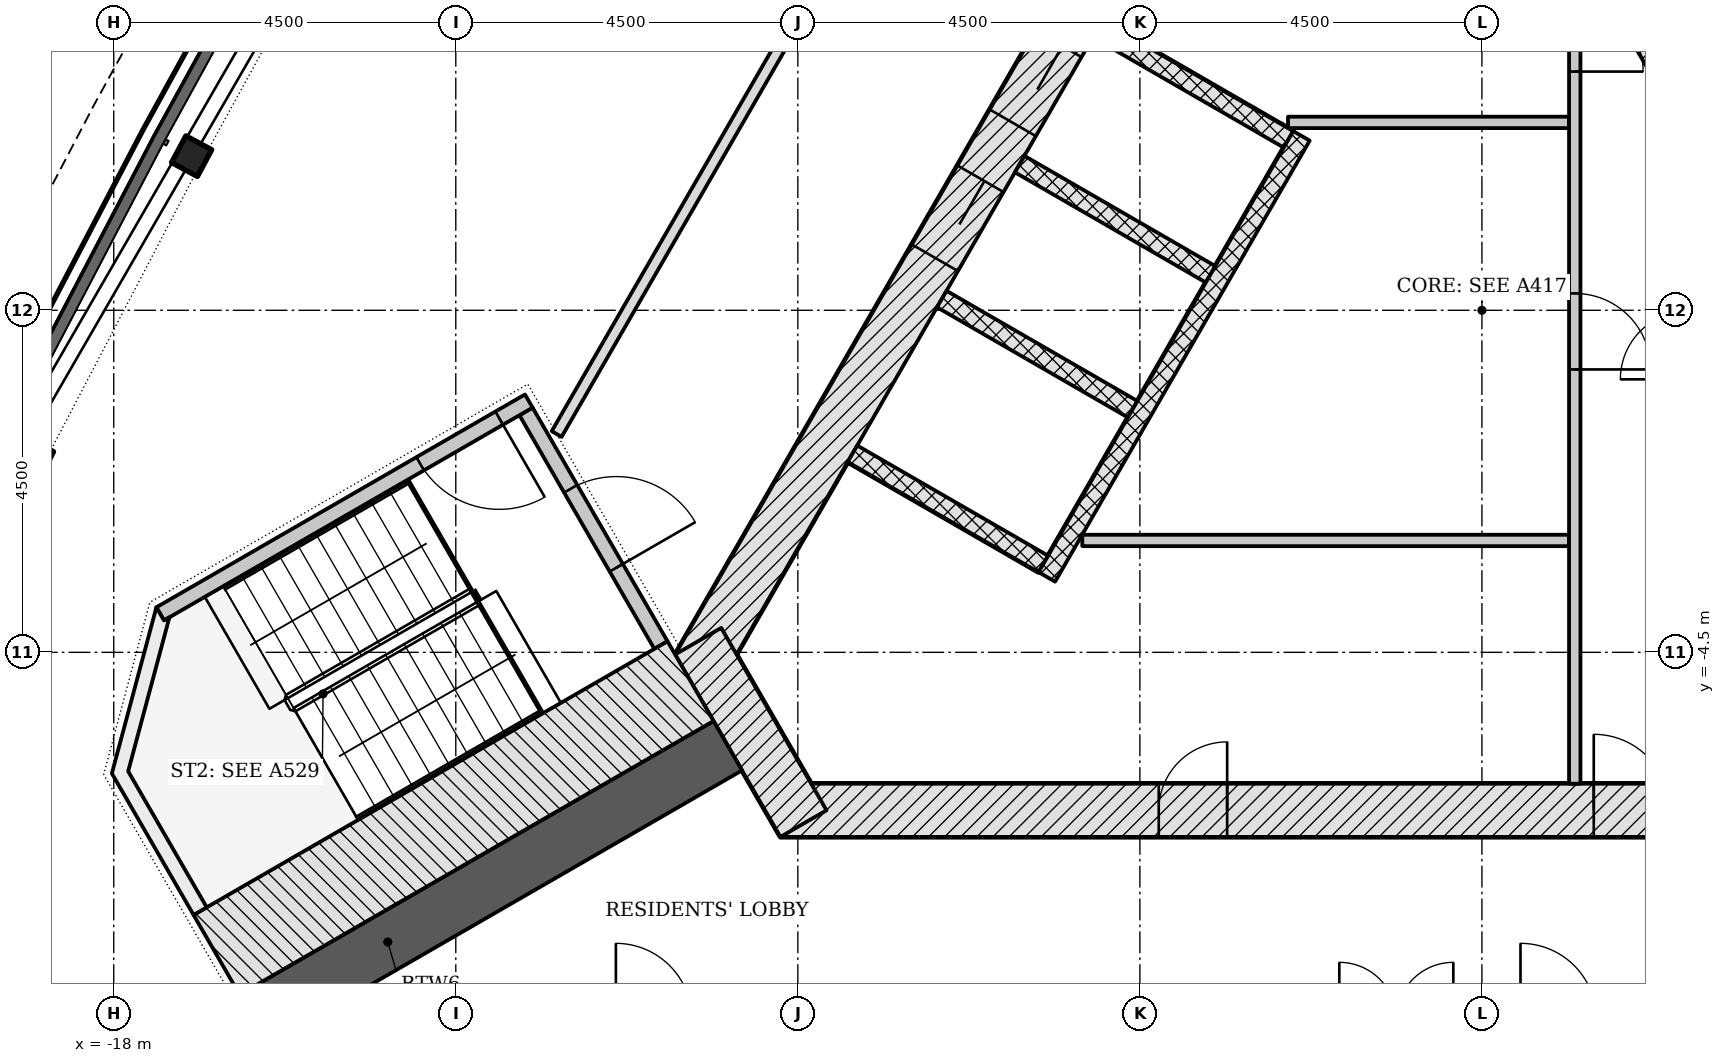
"""IFC4 building model, lengths in metres.
Left out: names, types, materials, properties, quantities, classifications, styles, units other than length and angle.
Written with IfcOpenShell. Run it as: python <this file> out.ifc"""

import sys

from ifc_helpers import new_model, si_unit, direction, frame, frame_2d, origin, origin_2d, place, context, subcontext, project, spatial, polyline, rectangle, i_section, outline, extrude, element, fill, save


model = new_model("IFC4")
c1 = context("Model", 3, precision=1e-05, world=origin(), true_north=direction((0.0, 1.0)))
c2 = subcontext(c1, "Body", "Model", "MODEL_VIEW")
j1 = project(units=[si_unit("LENGTHUNIT", "METRE"), si_unit("PLANEANGLEUNIT", "RADIAN")], contexts=[c1])
p1 = place(None, origin())
s1 = spatial("IfcSite", under=j1, at=p1, CompositionType="ELEMENT")
p2 = place(p1, origin())
s2 = spatial("IfcBuilding", under=s1, at=p2, CompositionType="ELEMENT")
p3 = place(p2, frame((0.0, 0.0, 158.1)))
s3 = spatial("IfcBuildingStorey", under=s2, at=p3, CompositionType="ELEMENT", Elevation=158.1)
p4 = place(p3, frame((-9.229, -6.578, -0.2), z_axis=(0.0, 0.0, 1.0), x_axis=(1.0, 0.0, 0.0)))
e1 = element("IfcWall", 1, at=p4, inside=s3, PredefinedType="SHEAR", context=c2, shape_type="SweptSolid", body=[
    extrude(rectangle(XDim=18.458, YDim=0.7, at=frame_2d((9.229, 0.0))), origin(), (0.0, 0.0, 1.0), 3.6),
])
p5 = place(p4, frame((10.7, 0.0, 0.2)))
e2 = element("IfcOpeningElement", 2, at=p5, cuts=e1, PredefinedType="OPENING", context=c2, shape_type="SweptSolid", body=[
    extrude(rectangle(XDim=1.0, YDim=2.1, at=frame_2d((0.5, 1.05))), frame((0.0, 0.36, 0.0), z_axis=(0.0, -1.0, 0.0), x_axis=(1.0, 0.0, 0.0)), (0.0, 0.0, 1.0), 0.72),
])
p6 = place(p4, frame((4.977, 0.0, 0.2)))
e3 = element("IfcOpeningElement", 3, at=p6, cuts=e1, PredefinedType="OPENING", context=c2, shape_type="SweptSolid", body=[
    extrude(rectangle(XDim=0.9, YDim=2.1, at=frame_2d((0.45, 1.05))), frame((0.0, 0.36, 0.0), z_axis=(0.0, -1.0, 0.0), x_axis=(1.0, 0.0, 0.0)), (0.0, 0.0, 1.0), 0.72),
])
p7 = place(p4, frame((14.552, 0.0, 0.2)))
e4 = element("IfcOpeningElement", 4, at=p7, cuts=e1, PredefinedType="OPENING", context=c2, shape_type="SweptSolid", body=[
    extrude(rectangle(XDim=0.9, YDim=2.1, at=frame_2d((0.45, 1.05))), frame((0.0, 0.36, 0.0), z_axis=(0.0, -1.0, 0.0), x_axis=(1.0, 0.0, 0.0)), (0.0, 0.0, 1.0), 0.72),
])
p8 = place(p3, frame((10.311, -4.703, -0.2), z_axis=(0.0, 0.0, 1.0), x_axis=(-0.500001446645, 0.866024568562, 0.0)))
e5 = element("IfcWall", 5, at=p8, inside=s3, PredefinedType="SHEAR", context=c2, shape_type="SweptSolid", body=[
    extrude(rectangle(XDim=18.458, YDim=0.7, at=frame_2d((9.229, 0.0))), origin(), (0.0, 0.0, 1.0), 3.6),
])
p9 = place(p8, frame((4.379, 0.0, 0.2)))
e6 = element("IfcOpeningElement", 6, at=p9, cuts=e5, PredefinedType="OPENING", context=c2, shape_type="SweptSolid", body=[
    extrude(rectangle(XDim=1.1, YDim=2.1, at=frame_2d((0.55, 1.05))), frame((0.0, 0.36, 0.0), z_axis=(0.0, -1.0, 0.0), x_axis=(1.0, 0.0, 0.0)), (0.0, 0.0, 1.0), 0.72),
])
p10 = place(p8, frame((6.529, 0.0, 0.2)))
e7 = element("IfcOpeningElement", 7, at=p10, cuts=e5, PredefinedType="OPENING", context=c2, shape_type="SweptSolid", body=[
    extrude(rectangle(XDim=1.1, YDim=2.1, at=frame_2d((0.55, 1.05))), frame((0.0, 0.36, 0.0), z_axis=(0.0, -1.0, 0.0), x_axis=(1.0, 0.0, 0.0)), (0.0, 0.0, 1.0), 0.72),
])
p11 = place(p8, frame((8.679, 0.0, 0.2)))
e8 = element("IfcOpeningElement", 8, at=p11, cuts=e5, PredefinedType="OPENING", context=c2, shape_type="SweptSolid", body=[
    extrude(rectangle(XDim=1.1, YDim=2.1, at=frame_2d((0.55, 1.05))), frame((0.0, 0.36, 0.0), z_axis=(0.0, -1.0, 0.0), x_axis=(1.0, 0.0, 0.0)), (0.0, 0.0, 1.0), 0.72),
])
p12 = place(p8, frame((10.829, 0.0, 0.2)))
e9 = element("IfcOpeningElement", 9, at=p12, cuts=e5, PredefinedType="OPENING", context=c2, shape_type="SweptSolid", body=[
    extrude(rectangle(XDim=1.1, YDim=2.1, at=frame_2d((0.55, 1.05))), frame((0.0, 0.36, 0.0), z_axis=(0.0, -1.0, 0.0), x_axis=(1.0, 0.0, 0.0)), (0.0, 0.0, 1.0), 0.72),
])
p13 = place(p8, frame((12.979, 0.0, 0.2)))
e10 = element("IfcOpeningElement", 10, at=p13, cuts=e5, PredefinedType="OPENING", context=c2, shape_type="SweptSolid", body=[
    extrude(rectangle(XDim=1.1, YDim=2.1, at=frame_2d((0.55, 1.05))), frame((0.0, 0.36, 0.0), z_axis=(0.0, -1.0, 0.0), x_axis=(1.0, 0.0, 0.0)), (0.0, 0.0, 1.0), 0.72),
])
p14 = place(p3, frame((-1.083, 11.281, -0.2), z_axis=(0.0, 0.0, 1.0), x_axis=(-0.500001446645, -0.866024568562, 0.0)))
e11 = element("IfcWall", 11, at=p14, inside=s3, PredefinedType="SHEAR", context=c2, shape_type="SweptSolid", body=[
    extrude(rectangle(XDim=18.458, YDim=0.7, at=frame_2d((9.229, 0.0))), origin(), (0.0, 0.0, 1.0), 3.6),
])
p15 = place(p14, frame((8.979, 0.0, 0.2)))
e12 = element("IfcOpeningElement", 12, at=p15, cuts=e11, PredefinedType="OPENING", context=c2, shape_type="SweptSolid", body=[
    extrude(rectangle(XDim=1.2, YDim=2.1, at=frame_2d((0.6, 1.05))), frame((0.0, 0.36, 0.0), z_axis=(0.0, -1.0, 0.0), x_axis=(1.0, 0.0, 0.0)), (0.0, 0.0, 1.0), 0.72),
])
p16 = place(p14, frame((11.029, 0.0, 0.2)))
e13 = element("IfcOpeningElement", 13, at=p16, cuts=e11, PredefinedType="OPENING", context=c2, shape_type="SweptSolid", body=[
    extrude(rectangle(XDim=1.2, YDim=2.1, at=frame_2d((0.6, 1.05))), frame((0.0, 0.36, 0.0), z_axis=(0.0, -1.0, 0.0), x_axis=(1.0, 0.0, 0.0)), (0.0, 0.0, 1.0), 0.72),
])
p17 = place(p3, frame((-10.311, -4.353, -0.2), z_axis=(0.0, 0.0, 1.0), x_axis=(0.500042739161, -0.866000726912, 0.0)))
e14 = element("IfcWall", 14, at=p17, inside=s3, PredefinedType="SHEAR", context=c2, shape_type="SweptSolid", body=[
    extrude(rectangle(XDim=2.771, YDim=0.7, at=frame_2d((1.386, 0.0))), origin(), (0.0, 0.0, 1.0), 3.6),
])
p18 = place(p3, frame((-9.922, -5.728, -0.2), z_axis=(0.0, 0.0, 1.0), x_axis=(-0.866025410072, -0.499999989109, 0.0)))
e15 = element("IfcWall", 15, at=p18, inside=s3, PredefinedType="SHEAR", context=c2, shape_type="SweptSolid", body=[
    extrude(rectangle(XDim=10.331, YDim=0.75, at=frame_2d((5.165, 0.0))), origin(), (0.0, 0.0, 1.0), 3.6),
])
for number, where, z_axis, x_axis in (
    (16, (-16.975, 2.028, -0.2), (0.0, 0.0, 1.0), (-0.473, -0.881, 0.0)),
    (17, (-19.055, -1.95, -0.2), (0.0, 0.0, 1.0), (-0.454, -0.891, 0.0)),
):
    element("IfcColumn", number, at=place(p3, frame(where, z_axis=z_axis, x_axis=x_axis)), inside=s3, PredefinedType="COLUMN", context=c2, shape_type="SweptSolid", body=[
        extrude(i_section(OverallWidth=0.399, OverallDepth=0.386, WebThickness=0.021, FlangeThickness=0.033, FilletRadius=0.015, at=origin_2d()), origin(), (0.0, 0.0, 1.0), 3.6),
    ])
p19 = place(p3, origin())
e18 = element("IfcWall", 18, at=p19, inside=s3, PredefinedType="NOTDEFINED", context=c2, shape_type="SweptSolid", body=[
    extrude(outline(polyline([(-21.545, -5.731), (-22.663, -8.078), (-23.092, -9.461), (-23.129, -10.908), (-22.773, -12.312), (-22.049, -13.566), (-21.011, -14.576), (-19.739, -15.267), (-18.327, -15.587), (-15.736, -15.793), (-15.712, -15.494), (-18.281, -15.29), (-19.632, -14.984), (-20.832, -14.333), (-21.81, -13.38), (-22.492, -12.198), (-22.828, -10.875), (-22.793, -9.51), (-22.382, -8.187), (-21.275, -5.86), (-21.545, -5.731)])), origin(), (0.0, 0.0, 1.0), 3.3),
])
p20 = place(p3, frame((5.87, -2.961, 0.0), z_axis=(0.0, 0.0, 1.0), x_axis=(-0.50000615651, 0.866021849293, 0.0)))
e19 = element("IfcWall", 19, at=p20, inside=s3, PredefinedType="PARTITIONING", context=c2, shape_type="SweptSolid", body=[
    extrude(rectangle(XDim=11.0, YDim=0.25, at=frame_2d((5.5, 0.0))), origin(), (0.0, 0.0, 1.0), 3.4),
])
for number, where, z_axis, x_axis in (
    (20, (-5.056, 3.699, -0.2), (0.0, 0.0, 1.0), (0.866, -0.5, 0.0)),
    (21, (-6.081, 1.923, -0.2), (0.0, 0.0, 1.0), (0.866, -0.5, 0.0)),
    (22, (-7.106, 0.148, -0.2), (0.0, 0.0, 1.0), (0.866, -0.5, 0.0)),
    (23, (-8.281, -1.887, -0.2), (0.0, 0.0, 1.0), (0.866, -0.5, 0.0)),
):
    element("IfcWall", number, at=place(p3, frame(where, z_axis=z_axis, x_axis=x_axis)), inside=s3, PredefinedType="PARTITIONING", context=c2, shape_type="SweptSolid", body=[
        extrude(rectangle(XDim=2.9, YDim=0.25, at=frame_2d((1.45, 0.0))), origin(), (0.0, 0.0, 1.0), 3.6),
    ])
p21 = place(p3, frame((-2.374, 2.294, 0.0), z_axis=(0.0, 0.0, 1.0), x_axis=(-0.500003174267, -0.866023571113, 0.0)))
e24 = element("IfcWall", 24, at=p21, inside=s3, PredefinedType="PARTITIONING", context=c2, shape_type="SweptSolid", body=[
    extrude(rectangle(XDim=6.7, YDim=0.25, at=frame_2d((3.35, 0.0))), origin(), (0.0, 0.0, 1.0), 3.4),
])
p22 = place(p3, frame((-5.258, -3.028, 0.0), z_axis=(0.0, 0.0, 1.0), x_axis=(1.0, 0.0, 0.0)))
e25 = element("IfcWall", 25, at=p22, inside=s3, PredefinedType="PARTITIONING", context=c2, shape_type="SweptSolid", body=[
    extrude(rectangle(XDim=6.404, YDim=0.15, at=frame_2d((3.202, 0.0))), origin(), (0.0, 0.0, 1.0), 3.4),
])
p23 = place(p3, frame((-2.551, 2.472, 0.0), z_axis=(0.0, 0.0, 1.0), x_axis=(1.0, 0.0, 0.0)))
e26 = element("IfcWall", 26, at=p23, inside=s3, PredefinedType="PARTITIONING", context=c2, shape_type="SweptSolid", body=[
    extrude(rectangle(XDim=3.698, YDim=0.15, at=frame_2d((1.849, 0.0))), origin(), (0.0, 0.0, 1.0), 3.4),
])
p24 = place(p3, frame((1.221, 4.711, 0.0), z_axis=(0.0, 0.0, 1.0), x_axis=(0.0, -1.0, 0.0)))
e27 = element("IfcWall", 27, at=p24, inside=s3, PredefinedType="PARTITIONING", context=c2, shape_type="SweptSolid", body=[
    extrude(rectangle(XDim=10.939, YDim=0.15, at=frame_2d((5.47, 0.0))), origin(), (0.0, 0.0, 1.0), 3.4),
])
p25 = place(p24, frame((4.489, 0.0, 0.0)))
e28 = element("IfcOpeningElement", 28, at=p25, cuts=e27, PredefinedType="OPENING", context=c2, shape_type="SweptSolid", body=[
    extrude(rectangle(XDim=1.0, YDim=2.1, at=frame_2d((0.5, 1.05))), frame((0.0, 0.085, 0.0), z_axis=(0.0, -1.0, 0.0), x_axis=(1.0, 0.0, 0.0)), (0.0, 0.0, 1.0), 0.17),
])
p26 = place(p24, frame((0.671, 0.0, 0.0)))
e29 = element("IfcOpeningElement", 29, at=p26, cuts=e27, PredefinedType="OPENING", context=c2, shape_type="SweptSolid", body=[
    extrude(rectangle(XDim=0.9, YDim=2.1, at=frame_2d((0.45, 1.05))), frame((0.0, 0.085, 0.0), z_axis=(0.0, -1.0, 0.0), x_axis=(1.0, 0.0, 0.0)), (0.0, 0.0, 1.0), 0.17),
])
p27 = place(p3, frame((-12.576, -1.331, -0.2), z_axis=(0.0, 0.0, 1.0), x_axis=(0.499970499736, -0.8660424351, 0.0)))
e30 = element("IfcWall", 30, at=p27, inside=s3, PredefinedType="SHEAR", context=c2, shape_type="SweptSolid", body=[
    extrude(rectangle(XDim=3.55, YDim=0.2, at=frame_2d((1.775, 0.0))), origin(), (0.0, 0.0, 1.0), 3.6),
])
p28 = place(p27, frame((1.175, 0.0, 0.2)))
e31 = element("IfcOpeningElement", 31, at=p28, cuts=e30, PredefinedType="OPENING", context=c2, shape_type="SweptSolid", body=[
    extrude(rectangle(XDim=1.2, YDim=2.1, at=frame_2d((0.6, 1.05))), frame((0.0, 0.11, 0.0), z_axis=(0.0, -1.0, 0.0), x_axis=(1.0, 0.0, 0.0)), (0.0, 0.0, 1.0), 0.22),
])
p29 = place(p3, frame((-12.539, -1.194, -0.2), z_axis=(0.0, 0.0, 1.0), x_axis=(-0.866045472092, -0.499965239061, 0.0)))
e32 = element("IfcWall", 32, at=p29, inside=s3, PredefinedType="SHEAR", context=c2, shape_type="SweptSolid", body=[
    extrude(rectangle(XDim=5.6, YDim=0.2, at=frame_2d((2.8, 0.0))), origin(), (0.0, 0.0, 1.0), 3.6),
])
p30 = place(p29, frame((0.45, 0.0, 0.2)))
e33 = element("IfcOpeningElement", 33, at=p30, cuts=e32, PredefinedType="OPENING", context=c2, shape_type="SweptSolid", body=[
    extrude(rectangle(XDim=1.2, YDim=2.1, at=frame_2d((0.6, 1.05))), frame((0.0, 0.11, 0.0), z_axis=(0.0, -1.0, 0.0), x_axis=(1.0, 0.0, 0.0)), (0.0, 0.0, 1.0), 0.22),
])
p31 = place(p3, frame((-10.412, -4.879, -0.2), z_axis=(0.0, 0.0, 1.0), x_axis=(-0.866026919366, -0.499997374926, 0.0)))
e34 = element("IfcWall", 34, at=p31, inside=s3, PredefinedType="SHEAR", context=c2, shape_type="SweptSolid", body=[
    extrude(rectangle(XDim=7.2, YDim=1.211, at=frame_2d((3.6, 0.0))), origin(), (0.0, 0.0, 1.0), 3.6),
])
p32 = place(p3, frame((0.0, 0.0, -0.2)))
e35 = element("IfcWall", 35, at=p32, inside=s3, PredefinedType="SHEAR", context=c2, shape_type="SweptSolid", body=[
    extrude(outline(polyline([(-17.439, -3.907), (-18.025, -6.093), (-16.95, -7.955), (-16.777, -7.855), (-17.81, -6.065), (-17.267, -4.039), (-17.339, -4.081), (-17.339, -4.081), (-17.339, -4.081), (-17.339, -4.081), (-17.339, -4.081), (-17.339, -4.081), (-17.339, -4.081), (-17.339, -4.081), (-17.339, -4.081), (-17.339, -4.081), (-17.339, -4.081), (-17.339, -4.081), (-17.339, -4.081), (-17.339, -4.081), (-17.339, -4.081), (-17.339, -4.081), (-17.339, -4.081), (-17.439, -3.907)])), origin(), (0.0, 0.0, 1.0), 3.6),
])
p33 = place(p3, frame((-5.253, 10.358, 0.0), z_axis=(0.0, 0.0, 1.0), x_axis=(-0.49999425657, -0.86602871973, 0.0)))
e36 = element("IfcWall", 36, at=p33, inside=s3, PredefinedType="PARTITIONING", context=c2, shape_type="SweptSolid", body=[
    extrude(rectangle(XDim=13.84, YDim=0.15, at=frame_2d((6.92, 0.0))), origin(), (0.0, 0.0, 1.0), 2.847),
])
p34 = place(p15, origin())
e37 = element("IfcDoor", 37, at=p34, inside=s3, OperationType="DOUBLE_DOOR_SLIDING", PredefinedType="DOOR", context=c2, shape_type="SweptSolid", body=[
    extrude(rectangle(XDim=1.2, YDim=2.1, at=frame_2d((0.6, 1.05))), frame((0.0, 0.025, 0.0), z_axis=(0.0, -1.0, 0.0), x_axis=(1.0, 0.0, 0.0)), (0.0, 0.0, 1.0), 0.05),
])
fill(e12, e37)
p35 = place(p16, origin())
e38 = element("IfcDoor", 38, at=p35, inside=s3, OperationType="DOUBLE_DOOR_SLIDING", PredefinedType="DOOR", context=c2, shape_type="SweptSolid", body=[
    extrude(rectangle(XDim=1.2, YDim=2.1, at=frame_2d((0.6, 1.05))), frame((0.0, 0.025, 0.0), z_axis=(0.0, -1.0, 0.0), x_axis=(1.0, 0.0, 0.0)), (0.0, 0.0, 1.0), 0.05),
])
fill(e13, e38)
p36 = place(p5, origin())
e39 = element("IfcDoor", 39, at=p36, inside=s3, OperationType="SINGLE_SWING_LEFT", PredefinedType="DOOR", context=c2, shape_type="SweptSolid", body=[
    extrude(rectangle(XDim=1.0, YDim=2.1, at=frame_2d((0.5, 1.05))), frame((0.0, 0.075, 0.0), z_axis=(0.0, -1.0, 0.0), x_axis=(1.0, 0.0, 0.0)), (0.0, 0.0, 1.0), 0.15),
])
fill(e2, e39)
p37 = place(p6, origin())
e40 = element("IfcDoor", 40, at=p37, inside=s3, OperationType="SINGLE_SWING_RIGHT", PredefinedType="DOOR", context=c2, shape_type="SweptSolid", body=[
    extrude(rectangle(XDim=0.9, YDim=2.1, at=frame_2d((0.45, 1.05))), frame((0.0, 0.075, 0.0), z_axis=(0.0, -1.0, 0.0), x_axis=(1.0, 0.0, 0.0)), (0.0, 0.0, 1.0), 0.15),
])
fill(e3, e40)
p38 = place(p25, origin())
e41 = element("IfcDoor", 41, at=p38, inside=s3, OperationType="SINGLE_SWING_RIGHT", PredefinedType="DOOR", context=c2, shape_type="SweptSolid", body=[
    extrude(rectangle(XDim=1.0, YDim=2.1, at=frame_2d((0.5, 1.05))), frame((0.0, 0.025, 0.0), z_axis=(0.0, -1.0, 0.0), x_axis=(1.0, 0.0, 0.0)), (0.0, 0.0, 1.0), 0.05),
])
fill(e28, e41)
p39 = place(p26, origin())
e42 = element("IfcDoor", 42, at=p39, inside=s3, OperationType="SINGLE_SWING_RIGHT", PredefinedType="DOOR", context=c2, shape_type="SweptSolid", body=[
    extrude(rectangle(XDim=0.9, YDim=2.1, at=frame_2d((0.45, 1.05))), frame((0.0, 0.025, 0.0), z_axis=(0.0, -1.0, 0.0), x_axis=(1.0, 0.0, 0.0)), (0.0, 0.0, 1.0), 0.05),
])
fill(e29, e42)
p40 = place(p28, origin())
e43 = element("IfcDoor", 43, at=p40, inside=s3, OperationType="SINGLE_SWING_RIGHT", PredefinedType="DOOR", context=c2, shape_type="SweptSolid", body=[
    extrude(rectangle(XDim=1.2, YDim=2.1, at=frame_2d((0.6, 1.05))), frame((0.0, 0.025, 0.0), z_axis=(0.0, -1.0, 0.0), x_axis=(1.0, 0.0, 0.0)), (0.0, 0.0, 1.0), 0.05),
])
fill(e31, e43)
p41 = place(p30, origin())
e44 = element("IfcDoor", 44, at=p41, inside=s3, OperationType="SINGLE_SWING_LEFT", PredefinedType="DOOR", context=c2, shape_type="SweptSolid", body=[
    extrude(rectangle(XDim=1.2, YDim=2.1, at=frame_2d((0.6, 1.05))), frame((0.0, 0.025, 0.0), z_axis=(0.0, -1.0, 0.0), x_axis=(1.0, 0.0, 0.0)), (0.0, 0.0, 1.0), 0.05),
])
fill(e33, e44)
save(model, sys.argv[1])
